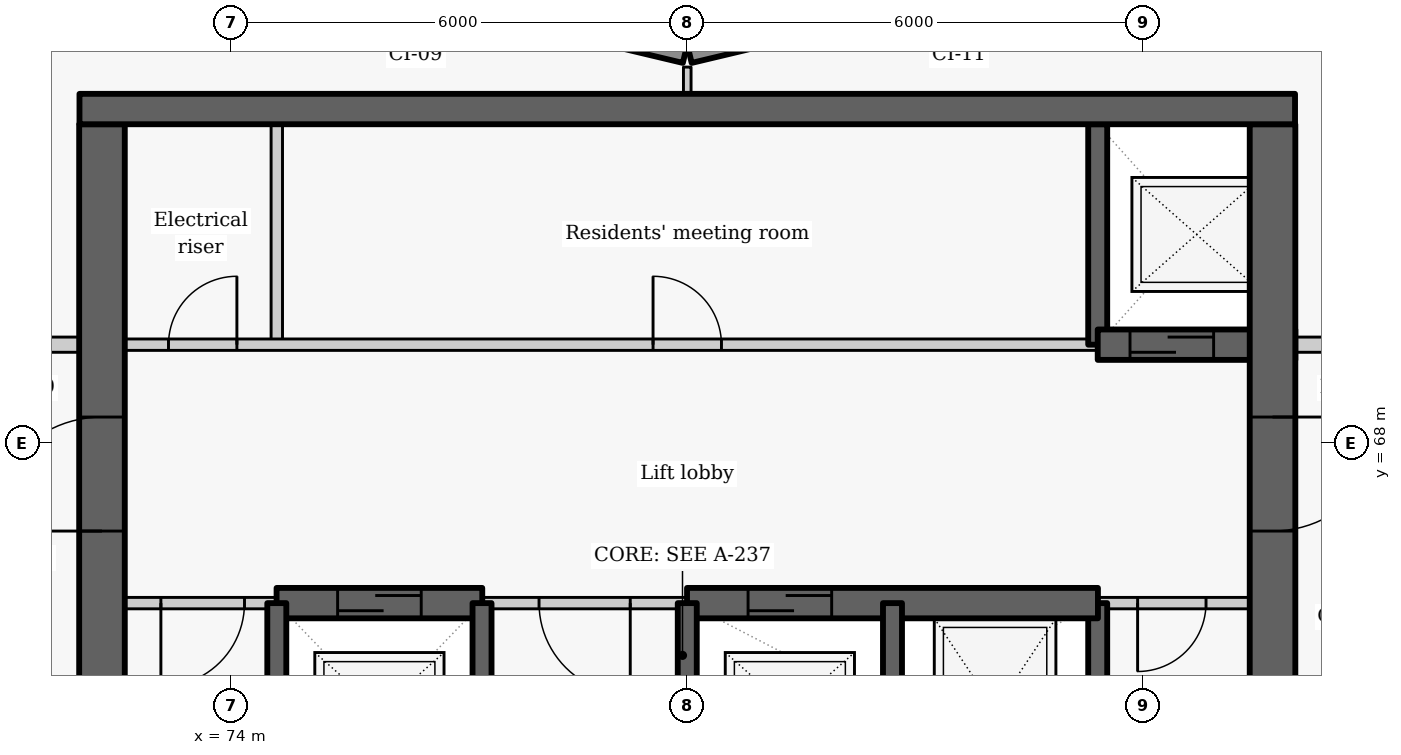
"""IFC4 building model, lengths in metres.
Left out: names, types, materials, properties, quantities, classifications, styles, units other than length and angle.
Written with IfcOpenShell. Run it as: python <this file> out.ifc"""

import sys

from ifc_helpers import new_model, si_unit, direction, frame, frame_2d, origin, place, context, subcontext, project, spatial, rectangle, extrude, element, fill, save


model = new_model("IFC4")
c1 = context("Model", 3, precision=1e-05, world=origin(), true_north=direction((0.0, 1.0)))
c2 = subcontext(c1, "Body", "Model", "MODEL_VIEW")
j1 = project(units=[si_unit("LENGTHUNIT", "METRE"), si_unit("PLANEANGLEUNIT", "RADIAN")], contexts=[c1])
p1 = place(None, origin())
s1 = spatial("IfcSite", under=j1, at=p1, CompositionType="ELEMENT")
p2 = place(p1, origin())
s2 = spatial("IfcBuilding", under=s1, at=p2, CompositionType="ELEMENT")
p3 = place(p2, frame((0.0, 0.0, 216.3)))
s3 = spatial("IfcBuildingStorey", under=s2, at=p3, CompositionType="ELEMENT", Elevation=216.3)
p4 = place(p3, frame((83.186, 73.881, 0.0), z_axis=(0.0, 0.0, 1.0), x_axis=(-0.972773113459, -0.231759508395, 0.0)))
e1 = element("IfcWall", 1, at=p4, inside=s3, PredefinedType="SOLIDWALL", context=c2, shape_type="SweptSolid", body=[
    extrude(rectangle(XDim=3.246, YDim=0.25, at=frame_2d((1.623, 0.0))), origin(), (0.0, 0.0, 1.0), 2.05),
])
p5 = place(p4, frame((0.573, 0.0, 0.9)))
e2 = element("IfcOpeningElement", 2, at=p5, cuts=e1, PredefinedType="OPENING", context=c2, shape_type="SweptSolid", body=[
    extrude(rectangle(XDim=2.1, YDim=1.1, at=frame_2d((1.05, 0.55))), frame((0.0, 0.135, 0.0), z_axis=(0.0, -1.0, 0.0), x_axis=(1.0, 0.0, 0.0)), (0.0, 0.0, 1.0), 0.27),
])
p6 = place(p3, frame((79.971, 73.128, 0.0), z_axis=(0.0, 0.0, 1.0), x_axis=(-0.972773113459, 0.231759508395, 0.0)))
e3 = element("IfcWall", 3, at=p6, inside=s3, PredefinedType="SOLIDWALL", context=c2, shape_type="SweptSolid", body=[
    extrude(rectangle(XDim=3.246, YDim=0.25, at=frame_2d((1.623, 0.0))), origin(), (0.0, 0.0, 1.0), 2.05),
])
p7 = place(p6, frame((0.573, 0.0, 0.9)))
e4 = element("IfcOpeningElement", 4, at=p7, cuts=e3, PredefinedType="OPENING", context=c2, shape_type="SweptSolid", body=[
    extrude(rectangle(XDim=2.1, YDim=1.1, at=frame_2d((1.05, 0.55))), frame((0.0, 0.135, 0.0), z_axis=(0.0, -1.0, 0.0), x_axis=(1.0, 0.0, 0.0)), (0.0, 0.0, 1.0), 0.27),
])
p8 = place(p3, frame((74.6, 69.3, 0.0), z_axis=(0.0, 0.0, 1.0), x_axis=(0.0, 1.0, 0.0)))
e5 = element("IfcWall", 5, at=p8, inside=s3, PredefinedType="PARTITIONING", context=c2, shape_type="SweptSolid", body=[
    extrude(rectangle(XDim=2.9, YDim=0.15, at=frame_2d((1.45, 0.0))), origin(), (0.0, 0.0, 1.0), 2.95),
])
p9 = place(p3, frame((72.0, 69.3, 0.0), z_axis=(0.0, 0.0, 1.0), x_axis=(1.0, 0.0, 0.0)))
e6 = element("IfcWall", 6, at=p9, inside=s3, PredefinedType="PARTITIONING", context=c2, shape_type="SweptSolid", body=[
    extrude(rectangle(XDim=13.4, YDim=0.15, at=frame_2d((6.7, 0.0))), origin(), (0.0, 0.0, 1.0), 2.95),
])
p10 = place(p9, frame((1.175, 0.0, 0.0)))
e7 = element("IfcOpeningElement", 7, at=p10, cuts=e6, PredefinedType="OPENING", context=c2, shape_type="SweptSolid", body=[
    extrude(rectangle(XDim=0.9, YDim=2.1, at=frame_2d((0.45, 1.05))), frame((0.0, 0.085, 0.0), z_axis=(0.0, -1.0, 0.0), x_axis=(1.0, 0.0, 0.0)), (0.0, 0.0, 1.0), 0.17),
])
p11 = place(p9, frame((7.55, 0.0, 0.0)))
e8 = element("IfcOpeningElement", 8, at=p11, cuts=e6, PredefinedType="OPENING", context=c2, shape_type="SweptSolid", body=[
    extrude(rectangle(XDim=0.9, YDim=2.1, at=frame_2d((0.45, 1.05))), frame((0.0, 0.085, 0.0), z_axis=(0.0, -1.0, 0.0), x_axis=(1.0, 0.0, 0.0)), (0.0, 0.0, 1.0), 0.17),
])
p12 = place(p3, frame((72.3, 63.1, -0.275), z_axis=(0.0, 0.0, 1.0), x_axis=(0.0, 1.0, 0.0)))
e9 = element("IfcWall", 9, at=p12, inside=s3, PredefinedType="SHEAR", context=c2, shape_type="SweptSolid", body=[
    extrude(rectangle(XDim=9.1, YDim=0.6, at=frame_2d((4.55, 0.0))), origin(), (0.0, 0.0, 1.0), 3.225),
])
p13 = place(p12, frame((3.748, 0.0, 0.275)))
e10 = element("IfcOpeningElement", 10, at=p13, cuts=e9, PredefinedType="OPENING", context=c2, shape_type="SweptSolid", body=[
    extrude(rectangle(XDim=1.5, YDim=2.1, at=frame_2d((0.75, 1.05))), frame((0.0, 0.31, 0.0), z_axis=(0.0, -1.0, 0.0), x_axis=(1.0, 0.0, 0.0)), (0.0, 0.0, 1.0), 0.62),
])
p14 = place(p3, frame((85.4, 63.1, -0.275), z_axis=(0.0, 0.0, 1.0), x_axis=(0.0, 1.0, 0.0)))
e11 = element("IfcWall", 11, at=p14, inside=s3, PredefinedType="SHEAR", context=c2, shape_type="SweptSolid", body=[
    extrude(rectangle(XDim=2.8, YDim=0.25, at=frame_2d((1.4, 0.0))), origin(), (0.0, 0.0, 1.0), 3.225),
])
p15 = place(p3, frame((85.4, 69.3, -0.275), z_axis=(0.0, 0.0, 1.0), x_axis=(0.0, 1.0, 0.0)))
e12 = element("IfcWall", 12, at=p15, inside=s3, PredefinedType="SHEAR", context=c2, shape_type="SweptSolid", body=[
    extrude(rectangle(XDim=2.9, YDim=0.25, at=frame_2d((1.45, 0.0))), origin(), (0.0, 0.0, 1.0), 3.225),
])
p16 = place(p3, frame((85.4, 69.3, -0.275), z_axis=(0.0, 0.0, 1.0), x_axis=(1.0, 0.0, 0.0)))
e13 = element("IfcWall", 13, at=p16, inside=s3, PredefinedType="SHEAR", context=c2, shape_type="SweptSolid", body=[
    extrude(rectangle(XDim=2.6, YDim=0.4, at=frame_2d((1.3, 0.0))), origin(), (0.0, 0.0, 1.0), 3.225),
])
p17 = place(p16, frame((0.425, 0.0, 0.275)))
e14 = element("IfcOpeningElement", 14, at=p17, cuts=e13, PredefinedType="OPENING", context=c2, shape_type="SweptSolid", body=[
    extrude(rectangle(XDim=1.1, YDim=2.1, at=frame_2d((0.55, 1.05))), frame((0.0, 0.21, 0.0), z_axis=(0.0, -1.0, 0.0), x_axis=(1.0, 0.0, 0.0)), (0.0, 0.0, 1.0), 0.42),
])
p18 = place(p3, frame((87.7, 72.2, -0.275), z_axis=(0.0, 0.0, 1.0), x_axis=(0.0, -1.0, 0.0)))
e15 = element("IfcWall", 15, at=p18, inside=s3, PredefinedType="SHEAR", context=c2, shape_type="SweptSolid", body=[
    extrude(rectangle(XDim=14.25, YDim=0.6, at=frame_2d((7.125, 0.0))), origin(), (0.0, 0.0, 1.0), 3.225),
])
p19 = place(p18, frame((3.852, 0.0, 0.275)))
e16 = element("IfcOpeningElement", 16, at=p19, cuts=e15, PredefinedType="OPENING", context=c2, shape_type="SweptSolid", body=[
    extrude(rectangle(XDim=1.5, YDim=2.1, at=frame_2d((0.75, 1.05))), frame((0.0, 0.31, 0.0), z_axis=(0.0, -1.0, 0.0), x_axis=(1.0, 0.0, 0.0)), (0.0, 0.0, 1.0), 0.62),
])
p20 = place(p3, frame((74.603, 65.9, 0.0), z_axis=(0.0, 0.0, 1.0), x_axis=(-1.0, 0.0, 0.0)))
e17 = element("IfcWall", 17, at=p20, inside=s3, PredefinedType="PARTITIONING", context=c2, shape_type="SweptSolid", body=[
    extrude(rectangle(XDim=2.603, YDim=0.15, at=frame_2d((1.302, 0.0))), origin(), (0.0, 0.0, 1.0), 2.95),
])
p21 = place(p20, frame((0.428, 0.0, 0.0)))
e18 = element("IfcOpeningElement", 18, at=p21, cuts=e17, PredefinedType="OPENING", context=c2, shape_type="SweptSolid", body=[
    extrude(rectangle(XDim=1.1, YDim=2.1, at=frame_2d((0.55, 1.05))), frame((0.0, 0.085, 0.0), z_axis=(0.0, -1.0, 0.0), x_axis=(1.0, 0.0, 0.0)), (0.0, 0.0, 1.0), 0.17),
])
p22 = place(p3, frame((80.003, 65.9, 0.0), z_axis=(0.0, 0.0, 1.0), x_axis=(-1.0, 0.0, 0.0)))
e19 = element("IfcWall", 19, at=p22, inside=s3, PredefinedType="PARTITIONING", context=c2, shape_type="SweptSolid", body=[
    extrude(rectangle(XDim=2.706, YDim=0.15, at=frame_2d((1.353, 0.0))), origin(), (0.0, 0.0, 1.0), 2.95),
])
p23 = place(p22, frame((0.753, 0.0, 0.0)))
e20 = element("IfcOpeningElement", 20, at=p23, cuts=e19, PredefinedType="OPENING", context=c2, shape_type="SweptSolid", body=[
    extrude(rectangle(XDim=1.2, YDim=2.1, at=frame_2d((0.6, 1.05))), frame((0.0, 0.085, 0.0), z_axis=(0.0, -1.0, 0.0), x_axis=(1.0, 0.0, 0.0)), (0.0, 0.0, 1.0), 0.17),
])
p24 = place(p3, frame((88.0, 65.9, 0.0), z_axis=(0.0, 0.0, 1.0), x_axis=(-1.0, 0.0, 0.0)))
e21 = element("IfcWall", 21, at=p24, inside=s3, PredefinedType="PARTITIONING", context=c2, shape_type="SweptSolid", body=[
    extrude(rectangle(XDim=2.603, YDim=0.15, at=frame_2d((1.302, 0.0))), origin(), (0.0, 0.0, 1.0), 2.95),
])
p25 = place(p24, frame((1.175, 0.0, 0.0)))
e22 = element("IfcOpeningElement", 22, at=p25, cuts=e21, PredefinedType="OPENING", context=c2, shape_type="SweptSolid", body=[
    extrude(rectangle(XDim=0.9, YDim=2.1, at=frame_2d((0.45, 1.05))), frame((0.0, 0.085, 0.0), z_axis=(0.0, -1.0, 0.0), x_axis=(1.0, 0.0, 0.0)), (0.0, 0.0, 1.0), 0.17),
])
p26 = place(p3, frame((74.597, 65.9, -0.275), z_axis=(0.0, 0.0, 1.0), x_axis=(1.0, 0.0, 0.0)))
e23 = element("IfcWall", 23, at=p26, inside=s3, PredefinedType="SHEAR", context=c2, shape_type="SweptSolid", body=[
    extrude(rectangle(XDim=2.706, YDim=0.4, at=frame_2d((1.353, 0.0))), origin(), (0.0, 0.0, 1.0), 3.225),
])
p27 = place(p26, frame((0.803, 0.0, 0.275)))
e24 = element("IfcOpeningElement", 24, at=p27, cuts=e23, PredefinedType="OPENING", context=c2, shape_type="SweptSolid", body=[
    extrude(rectangle(XDim=1.1, YDim=2.1, at=frame_2d((0.55, 1.05))), frame((0.0, 0.21, 0.0), z_axis=(0.0, -1.0, 0.0), x_axis=(1.0, 0.0, 0.0)), (0.0, 0.0, 1.0), 0.42),
])
p28 = place(p3, frame((79.997, 65.9, -0.275), z_axis=(0.0, 0.0, 1.0), x_axis=(1.0, 0.0, 0.0)))
e25 = element("IfcWall", 25, at=p28, inside=s3, PredefinedType="SHEAR", context=c2, shape_type="SweptSolid", body=[
    extrude(rectangle(XDim=5.406, YDim=0.4, at=frame_2d((2.703, 0.0))), origin(), (0.0, 0.0, 1.0), 3.225),
])
p29 = place(p28, frame((0.803, 0.0, 0.275)))
e26 = element("IfcOpeningElement", 26, at=p29, cuts=e25, PredefinedType="OPENING", context=c2, shape_type="SweptSolid", body=[
    extrude(rectangle(XDim=1.1, YDim=2.1, at=frame_2d((0.55, 1.05))), frame((0.0, 0.21, 0.0), z_axis=(0.0, -1.0, 0.0), x_axis=(1.0, 0.0, 0.0)), (0.0, 0.0, 1.0), 0.42),
])
for number, where, z_axis, x_axis in (
    (27, (74.6, 63.1, -0.275), (0.0, 0.0, 1.0), (0.0, 1.0, 0.0)),
    (28, (77.3, 63.1, -0.275), (0.0, 0.0, 1.0), (0.0, 1.0, 0.0)),
    (29, (80.0, 63.1, -0.275), (0.0, 0.0, 1.0), (0.0, 1.0, 0.0)),
    (30, (82.7, 63.1, -0.275), (0.0, 0.0, 1.0), (0.0, 1.0, 0.0)),
):
    element("IfcWall", number, at=place(p3, frame(where, z_axis=z_axis, x_axis=x_axis)), inside=s3, PredefinedType="SHEAR", context=c2, shape_type="SweptSolid", body=[
        extrude(rectangle(XDim=2.8, YDim=0.25, at=frame_2d((1.4, 0.0))), origin(), (0.0, 0.0, 1.0), 3.225),
    ])
for number, where, z_axis, x_axis in (
    (31, (70.45, 69.3, 0.0), (0.0, 0.0, 1.0), (1.0, 0.0, 0.0)),
    (32, (88.0, 69.3, 0.0), (0.0, 0.0, 1.0), (1.0, 0.0, 0.0)),
):
    element("IfcWall", number, at=place(p3, frame(where, z_axis=z_axis, x_axis=x_axis)), inside=s3, PredefinedType="PARTITIONING", context=c2, shape_type="SweptSolid", body=[
        extrude(rectangle(XDim=1.55, YDim=0.2, at=frame_2d((0.775, 0.0))), origin(), (0.0, 0.0, 1.0), 2.95),
    ])
p30 = place(p3, frame((80.0, 72.6, 0.0), z_axis=(0.0, 0.0, 1.0), x_axis=(0.0, 1.0, 0.0)))
e33 = element("IfcWall", 33, at=p30, inside=s3, PredefinedType="PARTITIONING", context=c2, shape_type="SweptSolid", body=[
    extrude(rectangle(XDim=0.352, YDim=0.1, at=frame_2d((0.176, 0.0))), origin(), (0.0, 0.0, 1.0), 2.95),
])
p31 = place(p3, frame((72.004, 72.4, -0.275), z_axis=(0.0, 0.0, 1.0), x_axis=(1.0, 0.0, 0.0)))
e34 = element("IfcWall", 34, at=p31, inside=s3, PredefinedType="SHEAR", context=c2, shape_type="SweptSolid", body=[
    extrude(rectangle(XDim=15.992, YDim=0.4, at=frame_2d((7.996, 0.0))), origin(), (0.0, 0.0, 1.0), 3.225),
])
p32 = place(p10, origin())
e35 = element("IfcDoor", 35, at=p32, inside=s3, OperationType="SINGLE_SWING_RIGHT", PredefinedType="DOOR", context=c2, shape_type="SweptSolid", body=[
    extrude(rectangle(XDim=0.9, YDim=2.1, at=frame_2d((0.45, 1.05))), frame((0.0, 0.025, 0.0), z_axis=(0.0, -1.0, 0.0), x_axis=(1.0, 0.0, 0.0)), (0.0, 0.0, 1.0), 0.05),
])
fill(e7, e35)
p33 = place(p17, origin())
e36 = element("IfcDoor", 36, at=p33, inside=s3, OperationType="SLIDING_TO_LEFT", PredefinedType="DOOR", context=c2, shape_type="SweptSolid", body=[
    extrude(rectangle(XDim=1.1, YDim=2.1, at=frame_2d((0.55, 1.05))), frame((0.0, 0.025, 0.0), z_axis=(0.0, -1.0, 0.0), x_axis=(1.0, 0.0, 0.0)), (0.0, 0.0, 1.0), 0.05),
])
fill(e14, e36)
p34 = place(p11, origin())
e37 = element("IfcDoor", 37, at=p34, inside=s3, OperationType="SINGLE_SWING_LEFT", PredefinedType="DOOR", context=c2, shape_type="SweptSolid", body=[
    extrude(rectangle(XDim=0.9, YDim=2.1, at=frame_2d((0.45, 1.05))), frame((0.0, 0.025, 0.0), z_axis=(0.0, -1.0, 0.0), x_axis=(1.0, 0.0, 0.0)), (0.0, 0.0, 1.0), 0.05),
])
fill(e8, e37)
p35 = place(p21, origin())
e38 = element("IfcDoor", 38, at=p35, inside=s3, OperationType="SINGLE_SWING_RIGHT", PredefinedType="DOOR", context=c2, shape_type="SweptSolid", body=[
    extrude(rectangle(XDim=1.1, YDim=2.1, at=frame_2d((0.55, 1.05))), frame((0.0, 0.025, 0.0), z_axis=(0.0, -1.0, 0.0), x_axis=(1.0, 0.0, 0.0)), (0.0, 0.0, 1.0), 0.05),
])
fill(e18, e38)
p36 = place(p27, origin())
e39 = element("IfcDoor", 39, at=p36, inside=s3, OperationType="SLIDING_TO_LEFT", PredefinedType="DOOR", context=c2, shape_type="SweptSolid", body=[
    extrude(rectangle(XDim=1.1, YDim=2.1, at=frame_2d((0.55, 1.05))), frame((0.0, 0.025, 0.0), z_axis=(0.0, -1.0, 0.0), x_axis=(1.0, 0.0, 0.0)), (0.0, 0.0, 1.0), 0.05),
])
fill(e24, e39)
p37 = place(p23, origin())
e40 = element("IfcDoor", 40, at=p37, inside=s3, OperationType="DOUBLE_DOOR_SINGLE_SWING", PredefinedType="DOOR", context=c2, shape_type="SweptSolid", body=[
    extrude(rectangle(XDim=1.2, YDim=2.1, at=frame_2d((0.6, 1.05))), frame((0.0, 0.025, 0.0), z_axis=(0.0, -1.0, 0.0), x_axis=(1.0, 0.0, 0.0)), (0.0, 0.0, 1.0), 0.05),
])
fill(e20, e40)
p38 = place(p29, origin())
e41 = element("IfcDoor", 41, at=p38, inside=s3, OperationType="SLIDING_TO_LEFT", PredefinedType="DOOR", context=c2, shape_type="SweptSolid", body=[
    extrude(rectangle(XDim=1.1, YDim=2.1, at=frame_2d((0.55, 1.05))), frame((0.0, 0.025, 0.0), z_axis=(0.0, -1.0, 0.0), x_axis=(1.0, 0.0, 0.0)), (0.0, 0.0, 1.0), 0.05),
])
fill(e26, e41)
p39 = place(p25, origin())
e42 = element("IfcDoor", 42, at=p39, inside=s3, OperationType="SINGLE_SWING_RIGHT", PredefinedType="DOOR", context=c2, shape_type="SweptSolid", body=[
    extrude(rectangle(XDim=0.9, YDim=2.1, at=frame_2d((0.45, 1.05))), frame((0.0, 0.025, 0.0), z_axis=(0.0, -1.0, 0.0), x_axis=(1.0, 0.0, 0.0)), (0.0, 0.0, 1.0), 0.05),
])
fill(e22, e42)
p40 = place(p19, origin())
e43 = element("IfcDoor", 43, at=p40, inside=s3, OperationType="DOUBLE_DOOR_SINGLE_SWING", PredefinedType="DOOR", context=c2, shape_type="SweptSolid", body=[
    extrude(rectangle(XDim=1.5, YDim=2.1, at=frame_2d((0.75, 1.05))), frame((0.0, 0.025, 0.0), z_axis=(0.0, -1.0, 0.0), x_axis=(1.0, 0.0, 0.0)), (0.0, 0.0, 1.0), 0.05),
])
fill(e16, e43)
p41 = place(p13, origin())
e44 = element("IfcDoor", 44, at=p41, inside=s3, OperationType="DOUBLE_DOOR_SINGLE_SWING", PredefinedType="DOOR", context=c2, shape_type="SweptSolid", body=[
    extrude(rectangle(XDim=1.5, YDim=2.1, at=frame_2d((0.75, 1.05))), frame((0.0, 0.025, 0.0), z_axis=(0.0, -1.0, 0.0), x_axis=(1.0, 0.0, 0.0)), (0.0, 0.0, 1.0), 0.05),
])
fill(e10, e44)
save(model, sys.argv[1])
